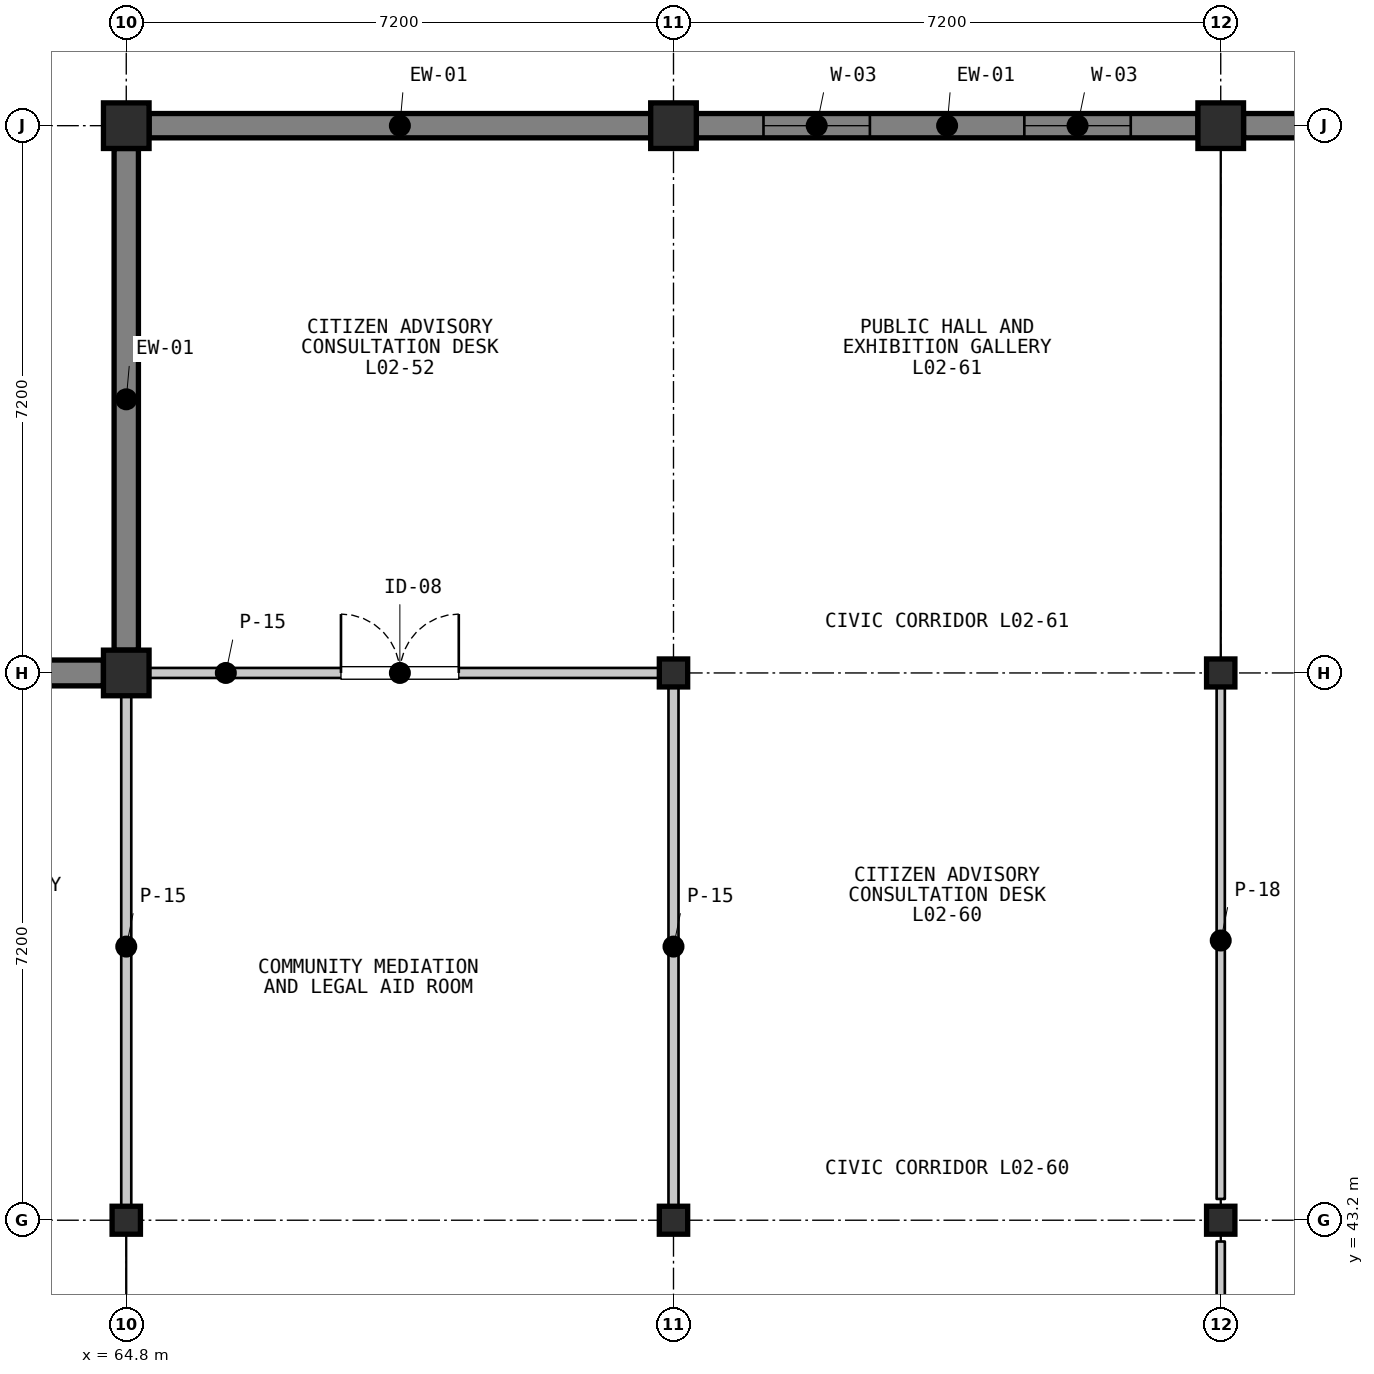
"""IFC4 building model, lengths in metres.
Left out: names, types, materials, properties, quantities, classifications, styles, units other than length and angle.
Written with IfcOpenShell. Run it as: python <this file> out.ifc"""

import sys

from ifc_helpers import new_model, si_unit, direction, frame, frame_2d, origin, origin_2d, place, context, subcontext, project, spatial, rectangle, i_section, extrude, element, fill, save


model = new_model("IFC4")
c1 = context("Model", 3, precision=1e-05, world=origin(), true_north=direction((0.0, 1.0)))
c2 = subcontext(c1, "Body", "Model", "MODEL_VIEW")
j1 = project(units=[si_unit("LENGTHUNIT", "METRE"), si_unit("PLANEANGLEUNIT", "RADIAN")], contexts=[c1])
p1 = place(None, origin())
s1 = spatial("IfcSite", under=j1, at=p1, CompositionType="ELEMENT")
p2 = place(p1, origin())
s2 = spatial("IfcBuilding", under=s1, at=p2, CompositionType="ELEMENT")
p3 = place(p2, frame((0.0, 0.0, 5.4)))
s3 = spatial("IfcBuildingStorey", under=s2, at=p3, CompositionType="ELEMENT", Elevation=5.4)
p4 = place(p3, frame((64.8, 43.2, 0.0), z_axis=(0.0, 0.0, 1.0), x_axis=(1.0, 0.0, 0.0)))
e1 = element("IfcColumn", 1, at=p4, inside=s3, PredefinedType="COLUMN", context=c2, shape_type="SweptSolid", body=[
    extrude(i_section(OverallWidth=0.373, OverallDepth=0.368, WebThickness=0.015, FlangeThickness=0.024, FilletRadius=0.015, at=origin_2d()), origin(), (0.0, 0.0, 1.0), 4.5),
])
for number, where, z_axis, x_axis in (
    (2, (64.8, 50.4, 0.0), (0.0, 0.0, 1.0), (1.0, 0.0, 0.0)),
    (3, (64.8, 57.6, 0.0), (0.0, 0.0, 1.0), (1.0, 0.0, 0.0)),
):
    element("IfcColumn", number, at=place(p3, frame(where, z_axis=z_axis, x_axis=x_axis)), inside=s3, PredefinedType="COLUMN", context=c2, shape_type="SweptSolid", body=[
        extrude(rectangle(XDim=0.6, YDim=0.6, at=origin_2d()), origin(), (0.0, 0.0, 1.0), 4.5),
    ])
for number, where, z_axis, x_axis in (
    (4, (72.0, 43.2, 0.0), (0.0, 0.0, 1.0), (1.0, 0.0, 0.0)),
    (5, (72.0, 50.4, 0.0), (0.0, 0.0, 1.0), (1.0, 0.0, 0.0)),
):
    element("IfcColumn", number, at=place(p3, frame(where, z_axis=z_axis, x_axis=x_axis)), inside=s3, PredefinedType="COLUMN", context=c2, shape_type="SweptSolid", body=[
        extrude(i_section(OverallWidth=0.373, OverallDepth=0.368, WebThickness=0.015, FlangeThickness=0.024, FilletRadius=0.015, at=origin_2d()), origin(), (0.0, 0.0, 1.0), 4.5),
    ])
p5 = place(p3, frame((72.0, 57.6, 0.0), z_axis=(0.0, 0.0, 1.0), x_axis=(1.0, 0.0, 0.0)))
e6 = element("IfcColumn", 6, at=p5, inside=s3, PredefinedType="COLUMN", context=c2, shape_type="SweptSolid", body=[
    extrude(rectangle(XDim=0.6, YDim=0.6, at=origin_2d()), origin(), (0.0, 0.0, 1.0), 4.5),
])
for number, where, z_axis, x_axis in (
    (7, (79.2, 43.2, 0.0), (0.0, 0.0, 1.0), (1.0, 0.0, 0.0)),
    (8, (79.2, 50.4, 0.0), (0.0, 0.0, 1.0), (1.0, 0.0, 0.0)),
):
    element("IfcColumn", number, at=place(p3, frame(where, z_axis=z_axis, x_axis=x_axis)), inside=s3, PredefinedType="COLUMN", context=c2, shape_type="SweptSolid", body=[
        extrude(i_section(OverallWidth=0.373, OverallDepth=0.368, WebThickness=0.015, FlangeThickness=0.024, FilletRadius=0.015, at=origin_2d()), origin(), (0.0, 0.0, 1.0), 4.5),
    ])
p6 = place(p3, frame((79.2, 57.6, 0.0), z_axis=(0.0, 0.0, 1.0), x_axis=(1.0, 0.0, 0.0)))
e9 = element("IfcColumn", 9, at=p6, inside=s3, PredefinedType="COLUMN", context=c2, shape_type="SweptSolid", body=[
    extrude(rectangle(XDim=0.6, YDim=0.6, at=origin_2d()), origin(), (0.0, 0.0, 1.0), 4.5),
])
p7 = place(p3, frame((57.85, 50.4, 0.0), z_axis=(0.0, 0.0, 1.0), x_axis=(1.0, 0.0, 0.0)))
e10 = element("IfcWall", 10, at=p7, inside=s3, PredefinedType="SOLIDWALL", context=c2, shape_type="SweptSolid", body=[
    extrude(rectangle(XDim=6.65, YDim=0.34, at=frame_2d((3.325, 0.0))), origin(), (0.0, 0.0, 1.0), 3.698),
])
p8 = place(p3, frame((65.1, 57.6, 0.0), z_axis=(0.0, 0.0, 1.0), x_axis=(1.0, 0.0, 0.0)))
e11 = element("IfcWall", 11, at=p8, inside=s3, PredefinedType="SOLIDWALL", context=c2, shape_type="SweptSolid", body=[
    extrude(rectangle(XDim=6.6, YDim=0.32, at=frame_2d((3.3, 0.0))), origin(), (0.0, 0.0, 1.0), 3.698),
])
p9 = place(p3, frame((64.8, 50.7, 0.0), z_axis=(0.0, 0.0, 1.0), x_axis=(0.0, 1.0, 0.0)))
e12 = element("IfcWall", 12, at=p9, inside=s3, PredefinedType="SOLIDWALL", context=c2, shape_type="SweptSolid", body=[
    extrude(rectangle(XDim=6.6, YDim=0.32, at=frame_2d((3.3, 0.0))), origin(), (0.0, 0.0, 1.0), 3.767),
])
p10 = place(p3, frame((72.3, 57.6, 0.0), z_axis=(0.0, 0.0, 1.0), x_axis=(1.0, 0.0, 0.0)))
e13 = element("IfcWall", 13, at=p10, inside=s3, PredefinedType="SOLIDWALL", context=c2, shape_type="SweptSolid", body=[
    extrude(rectangle(XDim=6.6, YDim=0.32, at=frame_2d((3.3, 0.0))), origin(), (0.0, 0.0, 1.0), 3.698),
])
p11 = place(p10, frame((0.884, 0.0, 0.95)))
e14 = element("IfcOpeningElement", 14, at=p11, cuts=e13, PredefinedType="OPENING", context=c2, shape_type="SweptSolid", body=[
    extrude(rectangle(XDim=1.4, YDim=2.1, at=frame_2d((0.7, 1.05))), frame((0.0, 0.17, 0.0), z_axis=(0.0, -1.0, 0.0), x_axis=(1.0, 0.0, 0.0)), (0.0, 0.0, 1.0), 0.34),
])
p12 = place(p10, frame((4.316, 0.0, 0.95)))
e15 = element("IfcOpeningElement", 15, at=p12, cuts=e13, PredefinedType="OPENING", context=c2, shape_type="SweptSolid", body=[
    extrude(rectangle(XDim=1.4, YDim=2.1, at=frame_2d((0.7, 1.05))), frame((0.0, 0.17, 0.0), z_axis=(0.0, -1.0, 0.0), x_axis=(1.0, 0.0, 0.0)), (0.0, 0.0, 1.0), 0.34),
])
p13 = place(p3, frame((79.5, 57.6, 0.0), z_axis=(0.0, 0.0, 1.0), x_axis=(1.0, 0.0, 0.0)))
e16 = element("IfcWall", 16, at=p13, inside=s3, PredefinedType="SOLIDWALL", context=c2, shape_type="SweptSolid", body=[
    extrude(rectangle(XDim=6.6, YDim=0.32, at=frame_2d((3.3, 0.0))), origin(), (0.0, 0.0, 1.0), 3.698),
])
p14 = place(p3, frame((64.92, 50.4, 0.0), z_axis=(0.0, 0.0, 1.0), x_axis=(1.0, 0.0, 0.0)))
e17 = element("IfcWall", 17, at=p14, inside=s3, PredefinedType="PARTITIONING", context=c2, shape_type="SweptSolid", body=[
    extrude(rectangle(XDim=6.96, YDim=0.132, at=frame_2d((3.48, 0.0))), origin(), (0.0, 0.0, 1.0), 3.688),
])
p15 = place(p14, frame((2.705, 0.0, 0.0)))
e18 = element("IfcOpeningElement", 18, at=p15, cuts=e17, PredefinedType="OPENING", context=c2, shape_type="SweptSolid", body=[
    extrude(rectangle(XDim=1.55, YDim=2.3, at=frame_2d((0.775, 1.15))), frame((0.0, 0.076, 0.0), z_axis=(0.0, -1.0, 0.0), x_axis=(1.0, 0.0, 0.0)), (0.0, 0.0, 1.0), 0.152),
])
for number, where, z_axis, x_axis in (
    (19, (64.8, 43.32, 0.0), (0.0, 0.0, 1.0), (0.0, 1.0, 0.0)),
    (20, (72.0, 50.28, 0.0), (0.0, 0.0, 1.0), (0.0, -1.0, 0.0)),
):
    element("IfcWall", number, at=place(p3, frame(where, z_axis=z_axis, x_axis=x_axis)), inside=s3, PredefinedType="PARTITIONING", context=c2, shape_type="SweptSolid", body=[
        extrude(rectangle(XDim=6.96, YDim=0.132, at=frame_2d((3.48, 0.0))), origin(), (0.0, 0.0, 1.0), 3.688),
    ])
p16 = place(p3, frame((79.2, 36.12, 0.0), z_axis=(0.0, 0.0, 1.0), x_axis=(0.0, 1.0, 0.0)))
e21 = element("IfcWall", 21, at=p16, inside=s3, PredefinedType="PARTITIONING", context=c2, shape_type="SweptSolid", body=[
    extrude(rectangle(XDim=6.8, YDim=0.108, at=frame_2d((3.4, 0.0))), origin(), (0.0, 0.0, 1.0), 3.688),
])
p17 = place(p3, frame((79.2, 43.48, 0.0), z_axis=(0.0, 0.0, 1.0), x_axis=(0.0, 1.0, 0.0)))
e22 = element("IfcWall", 22, at=p17, inside=s3, PredefinedType="PARTITIONING", context=c2, shape_type="SweptSolid", body=[
    extrude(rectangle(XDim=6.8, YDim=0.108, at=frame_2d((3.4, 0.0))), origin(), (0.0, 0.0, 1.0), 3.688),
])
p18 = place(p11, origin())
e23 = element("IfcWindow", 23, at=p18, inside=s3, PartitioningType="SINGLE_PANEL", PredefinedType="WINDOW", context=c2, shape_type="SweptSolid", body=[
    extrude(rectangle(XDim=1.4, YDim=2.1, at=frame_2d((0.7, 1.05))), frame((0.0, 0.03, 0.0), z_axis=(0.0, -1.0, 0.0), x_axis=(1.0, 0.0, 0.0)), (0.0, 0.0, 1.0), 0.06),
])
fill(e14, e23)
p19 = place(p12, origin())
e24 = element("IfcWindow", 24, at=p19, inside=s3, PartitioningType="SINGLE_PANEL", PredefinedType="WINDOW", context=c2, shape_type="SweptSolid", body=[
    extrude(rectangle(XDim=1.4, YDim=2.1, at=frame_2d((0.7, 1.05))), frame((0.0, 0.03, 0.0), z_axis=(0.0, -1.0, 0.0), x_axis=(1.0, 0.0, 0.0)), (0.0, 0.0, 1.0), 0.06),
])
fill(e15, e24)
p20 = place(p15, origin())
e25 = element("IfcDoor", 25, at=p20, inside=s3, OperationType="DOUBLE_DOOR_SINGLE_SWING", PredefinedType="DOOR", context=c2, shape_type="SweptSolid", body=[
    extrude(rectangle(XDim=1.55, YDim=2.3, at=frame_2d((0.775, 1.15))), frame((0.0, 0.025, 0.0), z_axis=(0.0, -1.0, 0.0), x_axis=(1.0, 0.0, 0.0)), (0.0, 0.0, 1.0), 0.05),
])
fill(e18, e25)
save(model, sys.argv[1])
